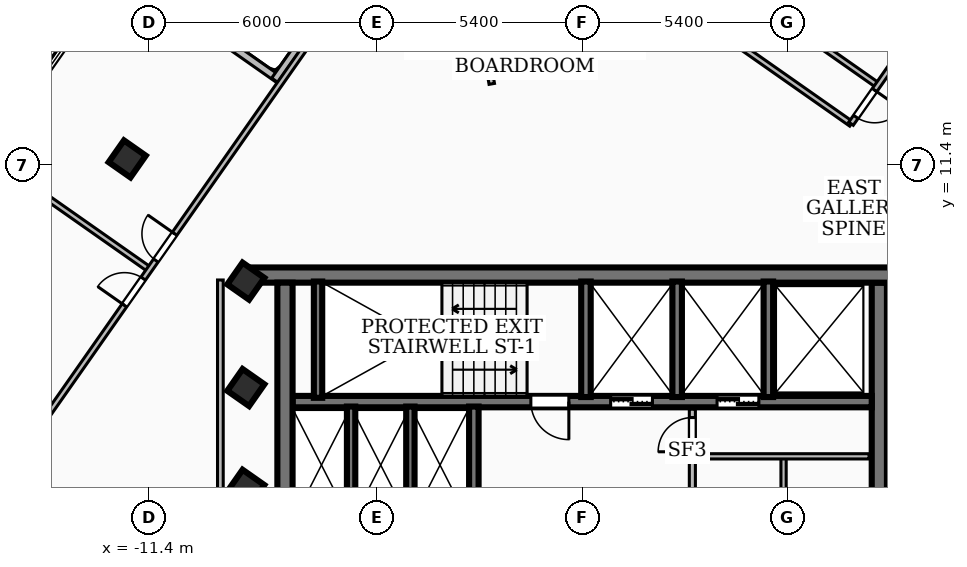
"""IFC4 building model, lengths in metres.
Left out: names, types, materials, properties, quantities, classifications, styles, units other than length and angle.
Written with IfcOpenShell. Run it as: python <this file> out.ifc"""

import sys

from ifc_helpers import new_model, si_unit, direction, frame, frame_2d, origin, origin_2d, place, context, subcontext, project, spatial, rectangle, extrude, element, fill, save


model = new_model("IFC4")
c1 = context("Model", 3, precision=1e-05, world=origin(), true_north=direction((0.0, 1.0)))
c2 = subcontext(c1, "Body", "Model", "MODEL_VIEW")
j1 = project(units=[si_unit("LENGTHUNIT", "METRE"), si_unit("PLANEANGLEUNIT", "RADIAN")], contexts=[c1])
p1 = place(None, origin())
s1 = spatial("IfcSite", under=j1, at=p1, CompositionType="ELEMENT")
p2 = place(p1, origin())
s2 = spatial("IfcBuilding", under=s1, at=p2, CompositionType="ELEMENT")
p3 = place(p2, frame((0.0, 0.0, 268.02)))
s3 = spatial("IfcBuildingStorey", under=s2, at=p3, CompositionType="ELEMENT", Elevation=268.02)
p4 = place(p3, frame((-8.78, 8.51, 0.0), z_axis=(0.0, 0.0, 1.0), x_axis=(1.0, 0.0, 0.0)))
e1 = element("IfcWall", 1, at=p4, inside=s3, PredefinedType="SHEAR", context=c2, shape_type="SweptSolid", body=[
    extrude(rectangle(XDim=17.56, YDim=0.4, at=frame_2d((8.78, 0.0))), origin(), (0.0, 0.0, 1.0), 3.16),
])
for number, where, z_axis, x_axis in (
    (2, (-7.82, 1.95, 0.0), (0.0, 0.0, 1.0), (0.0, 1.0, 0.0)),
    (3, (7.82, 8.31, 0.0), (0.0, 0.0, 1.0), (0.0, -1.0, 0.0)),
):
    element("IfcWall", number, at=place(p3, frame(where, z_axis=z_axis, x_axis=x_axis)), inside=s3, PredefinedType="SHEAR", context=c2, shape_type="SweptSolid", body=[
        extrude(rectangle(XDim=6.36, YDim=0.4, at=frame_2d((3.18, 0.0))), origin(), (0.0, 0.0, 1.0), 3.16),
    ])
p5 = place(p3, frame((7.62, 5.18, 0.0), z_axis=(0.0, 0.0, 1.0), x_axis=(-1.0, 0.0, 0.0)))
e4 = element("IfcWall", 4, at=p5, inside=s3, PredefinedType="SOLIDWALL", context=c2, shape_type="SweptSolid", body=[
    extrude(rectangle(XDim=15.24, YDim=0.3, at=frame_2d((7.62, 0.0))), origin(), (0.0, 0.0, 1.0), 3.16),
])
p6 = place(p5, frame((5.77, 0.0, 0.0)))
e5 = element("IfcOpeningElement", 5, at=p6, cuts=e4, PredefinedType="OPENING", context=c2, shape_type="SweptSolid", body=[
    extrude(rectangle(XDim=1.1, YDim=2.15, at=frame_2d((0.55, 1.075))), frame((0.0, 0.16, 0.0), z_axis=(0.0, -1.0, 0.0), x_axis=(1.0, 0.0, 0.0)), (0.0, 0.0, 1.0), 0.32),
])
p7 = place(p5, frame((2.97, 0.0, 0.0)))
e6 = element("IfcOpeningElement", 6, at=p7, cuts=e4, PredefinedType="OPENING", context=c2, shape_type="SweptSolid", body=[
    extrude(rectangle(XDim=1.1, YDim=2.15, at=frame_2d((0.55, 1.075))), frame((0.0, 0.16, 0.0), z_axis=(0.0, -1.0, 0.0), x_axis=(1.0, 0.0, 0.0)), (0.0, 0.0, 1.0), 0.32),
])
p8 = place(p5, frame((7.97, 0.0, 0.0)))
e7 = element("IfcOpeningElement", 7, at=p8, cuts=e4, PredefinedType="OPENING", context=c2, shape_type="SweptSolid", body=[
    extrude(rectangle(XDim=1.0, YDim=2.1, at=frame_2d((0.5, 1.05))), frame((0.0, 0.16, 0.0), z_axis=(0.0, -1.0, 0.0), x_axis=(1.0, 0.0, 0.0)), (0.0, 0.0, 1.0), 0.32),
])
p9 = place(p3, frame((-6.95, 5.28, 0.0), z_axis=(0.0, 0.0, 1.0), x_axis=(0.0, 1.0, 0.0)))
e8 = element("IfcWall", 8, at=p9, inside=s3, PredefinedType="SOLIDWALL", context=c2, shape_type="SweptSolid", body=[
    extrude(rectangle(XDim=3.06, YDim=0.22, at=frame_2d((1.53, 0.0))), origin(), (0.0, 0.0, 1.0), 3.16),
])
for number, where, z_axis, x_axis in (
    (9, (0.1, 5.3, 0.0), (0.0, 0.0, 1.0), (0.0, 1.0, 0.0)),
    (10, (2.5, 5.3, 0.0), (0.0, 0.0, 1.0), (0.0, 1.0, 0.0)),
    (11, (4.9, 5.3, 0.0), (0.0, 0.0, 1.0), (0.0, 1.0, 0.0)),
):
    element("IfcWall", number, at=place(p3, frame(where, z_axis=z_axis, x_axis=x_axis)), inside=s3, PredefinedType="SOLIDWALL", context=c2, shape_type="SweptSolid", body=[
        extrude(rectangle(XDim=3.04, YDim=0.25, at=frame_2d((1.52, 0.0))), origin(), (0.0, 0.0, 1.0), 3.16),
    ])
p10 = place(p3, frame((-2.85, 1.98, 0.0), z_axis=(0.0, 0.0, 1.0), x_axis=(0.0, 1.0, 0.0)))
e12 = element("IfcWall", 12, at=p10, inside=s3, PredefinedType="SOLIDWALL", context=c2, shape_type="SweptSolid", body=[
    extrude(rectangle(XDim=3.07, YDim=0.25, at=frame_2d((1.535, 0.0))), origin(), (0.0, 0.0, 1.0), 3.16),
])
for number, where, z_axis, x_axis in (
    (13, (-6.08, 1.98, 0.0), (0.0, 0.0, 1.0), (0.0, 1.0, 0.0)),
    (14, (-4.52, 1.98, 0.0), (0.0, 0.0, 1.0), (0.0, 1.0, 0.0)),
):
    element("IfcWall", number, at=place(p3, frame(where, z_axis=z_axis, x_axis=x_axis)), inside=s3, PredefinedType="SOLIDWALL", context=c2, shape_type="SweptSolid", body=[
        extrude(rectangle(XDim=3.07, YDim=0.22, at=frame_2d((1.535, 0.0))), origin(), (0.0, 0.0, 1.0), 3.16),
    ])
for number, where, z_axis, x_axis in (
    (15, (-8.85, 2.9, 0.0), (0.0, 0.0, 1.0), (0.574, 0.819, 0.0)),
    (16, (-8.85, 5.55, 0.0), (0.0, 0.0, 1.0), (0.574, 0.819, 0.0)),
    (17, (-8.85, 8.35, 0.0), (0.0, 0.0, 1.0), (0.574, 0.819, 0.0)),
    (18, (-11.971, 11.566, 0.0), (0.0, 0.0, 1.0), (0.574, 0.819, 0.0)),
):
    element("IfcColumn", number, at=place(p3, frame(where, z_axis=z_axis, x_axis=x_axis)), inside=s3, PredefinedType="COLUMN", context=c2, shape_type="SweptSolid", body=[
        extrude(rectangle(XDim=0.7, YDim=0.7, at=origin_2d()), origin(), (0.0, 0.0, 1.0), 3.42),
    ])
p11 = place(p3, frame((-10.957, 15.745, 0.0), z_axis=(0.0, 0.0, 1.0), x_axis=(0.818576054501, -0.574398157202, 0.0)))
e19 = element("IfcWall", 19, at=p11, inside=s3, PredefinedType="SOLIDWALL", context=c2, shape_type="SweptSolid", body=[
    extrude(rectangle(XDim=3.64, YDim=0.2, at=frame_2d((1.82, 0.0))), origin(), (0.0, 0.0, 1.0), 3.16),
])
p12 = place(p3, frame((-8.088, 13.635, 0.0), z_axis=(0.0, 0.0, 1.0), x_axis=(0.574286279317, 0.818654548261, 0.0)))
e20 = element("IfcWall", 20, at=p12, inside=s3, PredefinedType="SOLIDWALL", context=c2, shape_type="SweptSolid", body=[
    extrude(rectangle(XDim=6.441, YDim=0.2, at=frame_2d((3.22, 0.0))), origin(), (0.0, 0.0, 1.0), 3.16),
])
p13 = place(p3, frame((2.9, 2.04, 0.0), z_axis=(0.0, 0.0, 1.0), x_axis=(0.0, 1.0, 0.0)))
e21 = element("IfcWall", 21, at=p13, inside=s3, PredefinedType="PARTITIONING", context=c2, shape_type="SweptSolid", body=[
    extrude(rectangle(XDim=2.94, YDim=0.16, at=frame_2d((1.47, 0.0))), origin(), (0.0, 0.0, 1.0), 2.39),
])
p14 = place(p13, frame((1.82, 0.0, 0.0)))
e22 = element("IfcOpeningElement", 22, at=p14, cuts=e21, PredefinedType="OPENING", context=c2, shape_type="SweptSolid", body=[
    extrude(rectangle(XDim=0.9, YDim=2.06, at=frame_2d((0.45, 1.03))), frame((0.0, 0.09, 0.0), z_axis=(0.0, -1.0, 0.0), x_axis=(1.0, 0.0, 0.0)), (0.0, 0.0, 1.0), 0.18),
])
p15 = place(p3, frame((2.9, 3.74, 0.0), z_axis=(0.0, 0.0, 1.0), x_axis=(1.0, 0.0, 0.0)))
e23 = element("IfcWall", 23, at=p15, inside=s3, PredefinedType="PARTITIONING", context=c2, shape_type="SweptSolid", body=[
    extrude(rectangle(XDim=4.65, YDim=0.138, at=frame_2d((2.325, 0.0))), origin(), (0.0, 0.0, 1.0), 3.16),
])
p16 = place(p3, frame((5.3, 1.85, 0.0), z_axis=(0.0, 0.0, 1.0), x_axis=(0.0, 1.0, 0.0)))
e24 = element("IfcWall", 24, at=p16, inside=s3, PredefinedType="PARTITIONING", context=c2, shape_type="SweptSolid", body=[
    extrude(rectangle(XDim=1.89, YDim=0.138, at=frame_2d((0.945, 0.0))), origin(), (0.0, 0.0, 1.0), 2.39),
])
p17 = place(p3, frame((-9.52, 1.75, 0.0), z_axis=(0.0, 0.0, 1.0), x_axis=(0.0, 1.0, 0.0)))
e25 = element("IfcWall", 25, at=p17, inside=s3, PredefinedType="PARTITIONING", context=c2, shape_type="SweptSolid", body=[
    extrude(rectangle(XDim=6.63, YDim=0.15, at=frame_2d((3.315, 0.0))), origin(), (0.0, 0.0, 1.0), 2.53),
])
p18 = place(p3, frame((-2.378, 13.54, 0.0), z_axis=(0.0, 0.0, 1.0), x_axis=(-0.173019547247, 0.984918390665, 0.0)))
e26 = element("IfcWall", 26, at=p18, inside=s3, PredefinedType="PARTITIONING", context=c2, shape_type="SweptSolid", body=[
    extrude(rectangle(XDim=5.948, YDim=0.145, at=frame_2d((2.974, 0.0))), origin(), (0.0, 0.0, 1.0), 3.16),
])
p19 = place(p3, frame((7.083, 12.487, 0.0), z_axis=(0.0, 0.0, 1.0), x_axis=(-0.818818791344, 0.574052076855, 0.0)))
e27 = element("IfcWall", 27, at=p19, inside=s3, PredefinedType="PARTITIONING", context=c2, shape_type="SweptSolid", body=[
    extrude(rectangle(XDim=8.25, YDim=0.145, at=frame_2d((4.125, 0.0))), origin(), (0.0, 0.0, 1.0), 3.16),
])
p20 = place(p3, frame((7.765, 13.511, 0.0), z_axis=(0.0, 0.0, 1.0), x_axis=(-0.818761977847, 0.574133106198, 0.0)))
e28 = element("IfcWall", 28, at=p20, inside=s3, PredefinedType="PARTITIONING", context=c2, shape_type="SweptSolid", body=[
    extrude(rectangle(XDim=4.835, YDim=0.145, at=frame_2d((2.418, 0.0))), origin(), (0.0, 0.0, 1.0), 3.16),
])
p21 = place(p3, frame((9.09, 15.366, 0.0), z_axis=(0.0, 0.0, 1.0), x_axis=(-0.574097025606, -0.81878727713, 0.0)))
e29 = element("IfcWall", 29, at=p21, inside=s3, PredefinedType="PARTITIONING", context=c2, shape_type="SweptSolid", body=[
    extrude(rectangle(XDim=3.51, YDim=0.145, at=frame_2d((1.755, 0.0))), origin(), (0.0, 0.0, 1.0), 3.16),
])
p22 = place(p21, frame((2.43, 0.0, 0.0)))
e30 = element("IfcOpeningElement", 30, at=p22, cuts=e29, PredefinedType="OPENING", context=c2, shape_type="SweptSolid", body=[
    extrude(rectangle(XDim=0.86, YDim=2.04, at=frame_2d((0.43, 1.02))), frame((0.0, 0.083, 0.0), z_axis=(0.0, -1.0, 0.0), x_axis=(1.0, 0.0, 0.0)), (0.0, 0.0, 1.0), 0.165),
])
p23 = place(p21, frame((0.71, 0.0, 0.0)))
e31 = element("IfcOpeningElement", 31, at=p23, cuts=e29, PredefinedType="OPENING", context=c2, shape_type="SweptSolid", body=[
    extrude(rectangle(XDim=0.86, YDim=2.04, at=frame_2d((0.43, 1.02))), frame((0.0, 0.083, 0.0), z_axis=(0.0, -1.0, 0.0), x_axis=(1.0, 0.0, 0.0)), (0.0, 0.0, 1.0), 0.165),
])
p24 = place(p3, frame((5.115, 18.154, 0.0), z_axis=(0.0, 0.0, 1.0), x_axis=(0.818735813326, -0.574170417191, 0.0)))
e32 = element("IfcWall", 32, at=p24, inside=s3, PredefinedType="PARTITIONING", context=c2, shape_type="SweptSolid", body=[
    extrude(rectangle(XDim=12.77, YDim=0.145, at=frame_2d((6.385, 0.0))), origin(), (0.0, 0.0, 1.0), 2.53),
])
p25 = place(p24, frame((5.76, 0.0, 0.0)))
e33 = element("IfcOpeningElement", 33, at=p25, cuts=e32, PredefinedType="OPENING", context=c2, shape_type="SweptSolid", body=[
    extrude(rectangle(XDim=1.5, YDim=2.12, at=frame_2d((0.75, 1.06))), frame((0.0, 0.083, 0.0), z_axis=(0.0, -1.0, 0.0), x_axis=(1.0, 0.0, 0.0)), (0.0, 0.0, 1.0), 0.165),
])
p26 = place(p3, frame((-11.433, 8.689, 0.0), z_axis=(0.0, 0.0, 1.0), x_axis=(-0.81868341552, 0.574245126363, 0.0)))
e34 = element("IfcWall", 34, at=p26, inside=s3, PredefinedType="PARTITIONING", context=c2, shape_type="SweptSolid", body=[
    extrude(rectangle(XDim=5.085, YDim=0.145, at=frame_2d((2.542, 0.0))), origin(), (0.0, 0.0, 1.0), 3.16),
])
p27 = place(p3, frame((-17.625, -0.245, 0.0), z_axis=(0.0, 0.0, 1.0), x_axis=(0.574126736534, 0.818766444352, 0.0)))
e35 = element("IfcWall", 35, at=p27, inside=s3, PredefinedType="PARTITIONING", context=c2, shape_type="SweptSolid", body=[
    extrude(rectangle(XDim=20.34, YDim=0.145, at=frame_2d((10.17, 0.0))), origin(), (0.0, 0.0, 1.0), 2.53),
])
p28 = place(p27, frame((11.16, 0.0, 0.0)))
e36 = element("IfcOpeningElement", 36, at=p28, cuts=e35, PredefinedType="OPENING", context=c2, shape_type="SweptSolid", body=[
    extrude(rectangle(XDim=0.86, YDim=2.04, at=frame_2d((0.43, 1.02))), frame((0.0, 0.083, 0.0), z_axis=(0.0, -1.0, 0.0), x_axis=(1.0, 0.0, 0.0)), (0.0, 0.0, 1.0), 0.165),
])
p29 = place(p27, frame((9.72, 0.0, 0.0)))
e37 = element("IfcOpeningElement", 37, at=p29, cuts=e35, PredefinedType="OPENING", context=c2, shape_type="SweptSolid", body=[
    extrude(rectangle(XDim=0.86, YDim=2.04, at=frame_2d((0.43, 1.02))), frame((0.0, 0.083, 0.0), z_axis=(0.0, -1.0, 0.0), x_axis=(1.0, 0.0, 0.0)), (0.0, 0.0, 1.0), 0.165),
])
p30 = place(p6, origin())
e38 = element("IfcDoor", 38, at=p30, inside=s3, OperationType="DOUBLE_DOOR_SLIDING", PredefinedType="DOOR", context=c2, shape_type="SweptSolid", body=[
    extrude(rectangle(XDim=1.1, YDim=2.15, at=frame_2d((0.55, 1.075))), frame((0.0, 0.025, 0.0), z_axis=(0.0, -1.0, 0.0), x_axis=(1.0, 0.0, 0.0)), (0.0, 0.0, 1.0), 0.05),
])
fill(e5, e38)
p31 = place(p7, origin())
e39 = element("IfcDoor", 39, at=p31, inside=s3, OperationType="DOUBLE_DOOR_SLIDING", PredefinedType="DOOR", context=c2, shape_type="SweptSolid", body=[
    extrude(rectangle(XDim=1.1, YDim=2.15, at=frame_2d((0.55, 1.075))), frame((0.0, 0.025, 0.0), z_axis=(0.0, -1.0, 0.0), x_axis=(1.0, 0.0, 0.0)), (0.0, 0.0, 1.0), 0.05),
])
fill(e6, e39)
p32 = place(p8, origin())
e40 = element("IfcDoor", 40, at=p32, inside=s3, OperationType="SINGLE_SWING_LEFT", PredefinedType="DOOR", context=c2, shape_type="SweptSolid", body=[
    extrude(rectangle(XDim=1.0, YDim=2.1, at=frame_2d((0.5, 1.05))), frame((0.0, 0.025, 0.0), z_axis=(0.0, -1.0, 0.0), x_axis=(1.0, 0.0, 0.0)), (0.0, 0.0, 1.0), 0.05),
])
fill(e7, e40)
p33 = place(p14, origin())
e41 = element("IfcDoor", 41, at=p33, inside=s3, OperationType="SINGLE_SWING_LEFT", PredefinedType="DOOR", context=c2, shape_type="SweptSolid", body=[
    extrude(rectangle(XDim=0.9, YDim=2.06, at=frame_2d((0.45, 1.03))), frame((0.0, 0.025, 0.0), z_axis=(0.0, -1.0, 0.0), x_axis=(1.0, 0.0, 0.0)), (0.0, 0.0, 1.0), 0.05),
])
fill(e22, e41)
p34 = place(p22, origin())
e42 = element("IfcDoor", 42, at=p34, inside=s3, OperationType="SINGLE_SWING_LEFT", PredefinedType="DOOR", context=c2, shape_type="SweptSolid", body=[
    extrude(rectangle(XDim=0.86, YDim=2.04, at=frame_2d((0.43, 1.02))), frame((0.0, 0.025, 0.0), z_axis=(0.0, -1.0, 0.0), x_axis=(1.0, 0.0, 0.0)), (0.0, 0.0, 1.0), 0.05),
])
fill(e30, e42)
p35 = place(p28, origin())
e43 = element("IfcDoor", 43, at=p35, inside=s3, OperationType="SINGLE_SWING_RIGHT", PredefinedType="DOOR", context=c2, shape_type="SweptSolid", body=[
    extrude(rectangle(XDim=0.86, YDim=2.04, at=frame_2d((0.43, 1.02))), frame((0.0, 0.025, 0.0), z_axis=(0.0, -1.0, 0.0), x_axis=(1.0, 0.0, 0.0)), (0.0, 0.0, 1.0), 0.05),
])
fill(e36, e43)
p36 = place(p29, origin())
e44 = element("IfcDoor", 44, at=p36, inside=s3, OperationType="SINGLE_SWING_LEFT", PredefinedType="DOOR", context=c2, shape_type="SweptSolid", body=[
    extrude(rectangle(XDim=0.86, YDim=2.04, at=frame_2d((0.43, 1.02))), frame((0.0, 0.025, 0.0), z_axis=(0.0, -1.0, 0.0), x_axis=(1.0, 0.0, 0.0)), (0.0, 0.0, 1.0), 0.05),
])
fill(e37, e44)
save(model, sys.argv[1])
